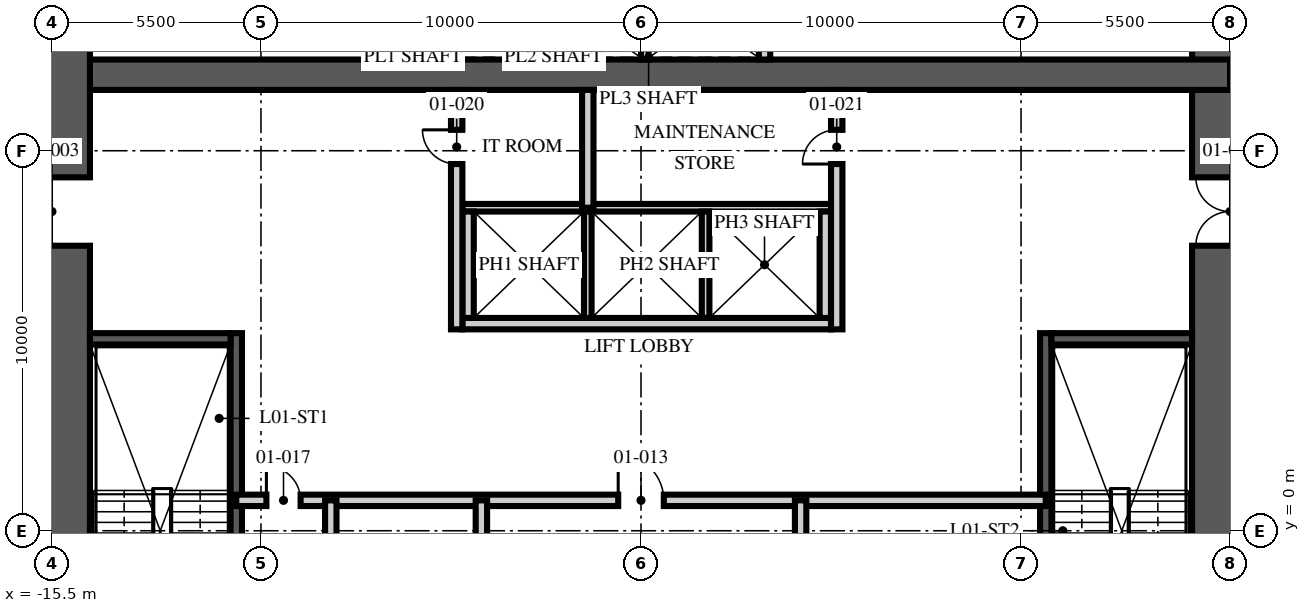
"""IFC4 building model, lengths in metres.
Left out: names, types, materials, properties, quantities, classifications, styles, units other than length and angle.
Written with IfcOpenShell. Run it as: python <this file> out.ifc"""

import sys

from ifc_helpers import new_model, si_unit, direction, frame, frame_2d, origin, place, context, subcontext, project, spatial, rectangle, extrude, element, fill, save


model = new_model("IFC4")
c1 = context("Model", 3, precision=1e-05, world=origin(), true_north=direction((0.0, 1.0)))
c2 = subcontext(c1, "Body", "Model", "MODEL_VIEW")
j1 = project(units=[si_unit("LENGTHUNIT", "METRE"), si_unit("PLANEANGLEUNIT", "RADIAN")], contexts=[c1])
p1 = place(None, origin())
s1 = spatial("IfcSite", under=j1, at=p1, CompositionType="ELEMENT")
p2 = place(p1, origin())
s2 = spatial("IfcBuilding", under=s1, at=p2, CompositionType="ELEMENT")
p3 = place(p2, frame((0.0, 0.0, 6.0)))
s3 = spatial("IfcBuildingStorey", under=s2, at=p3, CompositionType="ELEMENT", Elevation=6.0)
p4 = place(p3, frame((15.5, -15.5, -0.3), z_axis=(0.0, 0.0, 1.0), x_axis=(0.0, 1.0, 0.0)))
e1 = element("IfcWall", 1, at=p4, inside=s3, PredefinedType="SHEAR", context=c2, shape_type="SweptSolid", body=[
    extrude(rectangle(XDim=31.0, YDim=2.0, at=frame_2d((15.5, 0.0))), origin(), (0.0, 0.0, 1.0), 5.0),
])
p5 = place(p4, frame((6.5, 0.0, 0.3)))
e2 = element("IfcOpeningElement", 2, at=p5, cuts=e1, PredefinedType="OPENING", context=c2, shape_type="SweptSolid", body=[
    extrude(rectangle(XDim=1.2, YDim=2.1, at=frame_2d((0.6, 1.05))), frame((0.0, 1.01, 0.0), z_axis=(0.0, -1.0, 0.0), x_axis=(1.0, 0.0, 0.0)), (0.0, 0.0, 1.0), 2.02),
])
p6 = place(p4, frame((23.0, 0.0, 0.3)))
e3 = element("IfcOpeningElement", 3, at=p6, cuts=e1, PredefinedType="OPENING", context=c2, shape_type="SweptSolid", body=[
    extrude(rectangle(XDim=1.8, YDim=2.1, at=frame_2d((0.9, 1.05))), frame((0.0, 1.01, 0.0), z_axis=(0.0, -1.0, 0.0), x_axis=(1.0, 0.0, 0.0)), (0.0, 0.0, 1.0), 2.02),
])
p7 = place(p3, frame((-15.5, 12.0, -0.3), z_axis=(0.0, 0.0, 1.0), x_axis=(1.0, 0.0, 0.0)))
e4 = element("IfcWall", 4, at=p7, inside=s3, PredefinedType="SHEAR", context=c2, shape_type="SweptSolid", body=[
    extrude(rectangle(XDim=31.0, YDim=0.8, at=frame_2d((15.5, 0.0))), origin(), (0.0, 0.0, 1.0), 5.0),
])
p8 = place(p3, frame((-15.5, -15.5, -0.3), z_axis=(0.0, 0.0, 1.0), x_axis=(0.0, 1.0, 0.0)))
e5 = element("IfcWall", 5, at=p8, inside=s3, PredefinedType="SHEAR", context=c2, shape_type="SweptSolid", body=[
    extrude(rectangle(XDim=31.0, YDim=2.0, at=frame_2d((15.5, 0.0))), origin(), (0.0, 0.0, 1.0), 5.0),
])
p9 = place(p8, frame((6.5, 0.0, 0.3)))
e6 = element("IfcOpeningElement", 6, at=p9, cuts=e5, PredefinedType="OPENING", context=c2, shape_type="SweptSolid", body=[
    extrude(rectangle(XDim=1.2, YDim=2.1, at=frame_2d((0.6, 1.05))), frame((0.0, 1.01, 0.0), z_axis=(0.0, -1.0, 0.0), x_axis=(1.0, 0.0, 0.0)), (0.0, 0.0, 1.0), 2.02),
])
p10 = place(p8, frame((23.0, 0.0, 0.3)))
e7 = element("IfcOpeningElement", 7, at=p10, cuts=e5, PredefinedType="OPENING", context=c2, shape_type="SweptSolid", body=[
    extrude(rectangle(XDim=1.8, YDim=2.1, at=frame_2d((0.9, 1.05))), frame((0.0, 1.01, 0.0), z_axis=(0.0, -1.0, 0.0), x_axis=(1.0, 0.0, 0.0)), (0.0, 0.0, 1.0), 2.02),
])
p11 = place(p3, frame((-10.65, -4.9, 0.0), z_axis=(0.0, 0.0, 1.0), x_axis=(0.0, 1.0, 0.0)))
e8 = element("IfcWall", 8, at=p11, inside=s3, PredefinedType="SOLIDWALL", context=c2, shape_type="SweptSolid", body=[
    extrude(rectangle(XDim=10.1, YDim=0.3, at=frame_2d((5.05, 0.0))), origin(), (0.0, 0.0, 1.0), 4.7),
])
p12 = place(p3, frame((-14.5, 5.05, 0.0), z_axis=(0.0, 0.0, 1.0), x_axis=(1.0, 0.0, 0.0)))
e9 = element("IfcWall", 9, at=p12, inside=s3, PredefinedType="SOLIDWALL", context=c2, shape_type="SweptSolid", body=[
    extrude(rectangle(XDim=3.7, YDim=0.3, at=frame_2d((1.85, 0.0))), origin(), (0.0, 0.0, 1.0), 4.7),
])
p13 = place(p3, frame((10.65, -4.9, 0.0), z_axis=(0.0, 0.0, 1.0), x_axis=(0.0, 1.0, 0.0)))
e10 = element("IfcWall", 10, at=p13, inside=s3, PredefinedType="SOLIDWALL", context=c2, shape_type="SweptSolid", body=[
    extrude(rectangle(XDim=10.1, YDim=0.3, at=frame_2d((5.05, 0.0))), origin(), (0.0, 0.0, 1.0), 4.7),
])
p14 = place(p3, frame((14.5, 5.05, 0.0), z_axis=(0.0, 0.0, 1.0), x_axis=(-1.0, 0.0, 0.0)))
e11 = element("IfcWall", 11, at=p14, inside=s3, PredefinedType="SOLIDWALL", context=c2, shape_type="SweptSolid", body=[
    extrude(rectangle(XDim=3.7, YDim=0.3, at=frame_2d((1.85, 0.0))), origin(), (0.0, 0.0, 1.0), 4.7),
])
p15 = place(p3, frame((-4.7, 5.45, 0.0), z_axis=(0.0, 0.0, 1.0), x_axis=(1.0, 0.0, 0.0)))
e12 = element("IfcWall", 12, at=p15, inside=s3, PredefinedType="PARTITIONING", context=c2, shape_type="SweptSolid", body=[
    extrude(rectangle(XDim=9.7, YDim=0.3, at=frame_2d((4.85, 0.0))), origin(), (0.0, 0.0, 1.0), 4.7),
])
p16 = place(p3, frame((-4.7, 8.5, 0.0), z_axis=(0.0, 0.0, 1.0), x_axis=(1.0, 0.0, 0.0)))
e13 = element("IfcWall", 13, at=p16, inside=s3, PredefinedType="PARTITIONING", context=c2, shape_type="SweptSolid", body=[
    extrude(rectangle(XDim=9.7, YDim=0.2, at=frame_2d((4.85, 0.0))), origin(), (0.0, 0.0, 1.0), 4.7),
])
for number, where, z_axis, x_axis in (
    (14, (-4.55, 5.6, 0.0), (0.0, 0.0, 1.0), (0.0, 1.0, 0.0)),
    (15, (4.85, 5.6, 0.0), (0.0, 0.0, 1.0), (0.0, 1.0, 0.0)),
):
    element("IfcWall", number, at=place(p3, frame(where, z_axis=z_axis, x_axis=x_axis)), inside=s3, PredefinedType="PARTITIONING", context=c2, shape_type="SweptSolid", body=[
        extrude(rectangle(XDim=2.8, YDim=0.3, at=frame_2d((1.4, 0.0))), origin(), (0.0, 0.0, 1.0), 4.7),
    ])
for number, where, z_axis, x_axis in (
    (16, (-1.4, 5.6, 0.0), (0.0, 0.0, 1.0), (0.0, 1.0, 0.0)),
    (17, (1.7, 5.6, 0.0), (0.0, 0.0, 1.0), (0.0, 1.0, 0.0)),
):
    element("IfcWall", number, at=place(p3, frame(where, z_axis=z_axis, x_axis=x_axis)), inside=s3, PredefinedType="PARTITIONING", context=c2, shape_type="SweptSolid", body=[
        extrude(rectangle(XDim=2.8, YDim=0.2, at=frame_2d((1.4, 0.0))), origin(), (0.0, 0.0, 1.0), 4.7),
    ])
for number, where, z_axis, x_axis in (
    (18, (-6.15, 12.4, 0.0), (0.0, 0.0, 1.0), (0.0, 1.0, 0.0)),
    (19, (3.25, 12.4, 0.0), (0.0, 0.0, 1.0), (0.0, 1.0, 0.0)),
):
    element("IfcWall", number, at=place(p3, frame(where, z_axis=z_axis, x_axis=x_axis)), inside=s3, PredefinedType="PARTITIONING", context=c2, shape_type="SweptSolid", body=[
        extrude(rectangle(XDim=2.1, YDim=0.3, at=frame_2d((1.05, 0.0))), origin(), (0.0, 0.0, 1.0), 4.7),
    ])
for number, where, z_axis, x_axis in (
    (20, (-3.0, 12.4, 0.0), (0.0, 0.0, 1.0), (0.0, 1.0, 0.0)),
    (21, (0.1, 12.4, 0.0), (0.0, 0.0, 1.0), (0.0, 1.0, 0.0)),
):
    element("IfcWall", number, at=place(p3, frame(where, z_axis=z_axis, x_axis=x_axis)), inside=s3, PredefinedType="PARTITIONING", context=c2, shape_type="SweptSolid", body=[
        extrude(rectangle(XDim=2.1, YDim=0.2, at=frame_2d((1.05, 0.0))), origin(), (0.0, 0.0, 1.0), 4.7),
    ])
p17 = place(p3, frame((-10.65, 0.8, 0.0), z_axis=(0.0, 0.0, 1.0), x_axis=(1.0, 0.0, 0.0)))
e22 = element("IfcWall", 22, at=p17, inside=s3, PredefinedType="PARTITIONING", context=c2, shape_type="SweptSolid", body=[
    extrude(rectangle(XDim=21.3, YDim=0.3, at=frame_2d((10.65, 0.0))), origin(), (0.0, 0.0, 1.0), 4.7),
])
p18 = place(p17, frame((10.05, 0.0, 0.0)))
e23 = element("IfcOpeningElement", 23, at=p18, cuts=e22, PredefinedType="OPENING", context=c2, shape_type="SweptSolid", body=[
    extrude(rectangle(XDim=1.2, YDim=2.1, at=frame_2d((0.6, 1.05))), frame((0.0, 0.16, 0.0), z_axis=(0.0, -1.0, 0.0), x_axis=(1.0, 0.0, 0.0)), (0.0, 0.0, 1.0), 0.32),
])
p19 = place(p17, frame((0.793, 0.0, 0.0)))
e24 = element("IfcOpeningElement", 24, at=p19, cuts=e22, PredefinedType="OPENING", context=c2, shape_type="SweptSolid", body=[
    extrude(rectangle(XDim=0.9, YDim=2.1, at=frame_2d((0.45, 1.05))), frame((0.0, 0.16, 0.0), z_axis=(0.0, -1.0, 0.0), x_axis=(1.0, 0.0, 0.0)), (0.0, 0.0, 1.0), 0.32),
])
p20 = place(p3, frame((-4.2, -6.65, 0.0), z_axis=(0.0, 0.0, 1.0), x_axis=(0.0, 1.0, 0.0)))
e25 = element("IfcWall", 25, at=p20, inside=s3, PredefinedType="PARTITIONING", context=c2, shape_type="SweptSolid", body=[
    extrude(rectangle(XDim=7.45, YDim=0.3, at=frame_2d((3.725, 0.0))), origin(), (0.0, 0.0, 1.0), 4.7),
])
p21 = place(p20, frame((3.275, 0.0, 0.0)))
e26 = element("IfcOpeningElement", 26, at=p21, cuts=e25, PredefinedType="OPENING", context=c2, shape_type="SweptSolid", body=[
    extrude(rectangle(XDim=0.9, YDim=2.1, at=frame_2d((0.45, 1.05))), frame((0.0, 0.16, 0.0), z_axis=(0.0, -1.0, 0.0), x_axis=(1.0, 0.0, 0.0)), (0.0, 0.0, 1.0), 0.32),
])
p22 = place(p3, frame((4.2, -6.65, 0.0), z_axis=(0.0, 0.0, 1.0), x_axis=(0.0, 1.0, 0.0)))
e27 = element("IfcWall", 27, at=p22, inside=s3, PredefinedType="PARTITIONING", context=c2, shape_type="SweptSolid", body=[
    extrude(rectangle(XDim=7.45, YDim=0.3, at=frame_2d((3.725, 0.0))), origin(), (0.0, 0.0, 1.0), 4.7),
])
p23 = place(p22, frame((0.866, 0.0, 0.0)))
e28 = element("IfcOpeningElement", 28, at=p23, cuts=e27, PredefinedType="OPENING", context=c2, shape_type="SweptSolid", body=[
    extrude(rectangle(XDim=0.9, YDim=2.1, at=frame_2d((0.45, 1.05))), frame((0.0, 0.16, 0.0), z_axis=(0.0, -1.0, 0.0), x_axis=(1.0, 0.0, 0.0)), (0.0, 0.0, 1.0), 0.32),
])
p24 = place(p22, frame((4.591, 0.0, 0.0)))
e29 = element("IfcOpeningElement", 29, at=p24, cuts=e27, PredefinedType="OPENING", context=c2, shape_type="SweptSolid", body=[
    extrude(rectangle(XDim=0.9, YDim=2.1, at=frame_2d((0.45, 1.05))), frame((0.0, 0.16, 0.0), z_axis=(0.0, -1.0, 0.0), x_axis=(1.0, 0.0, 0.0)), (0.0, 0.0, 1.0), 0.32),
])
p25 = place(p3, frame((-8.163, -6.65, 0.0), z_axis=(0.0, 0.0, 1.0), x_axis=(0.0, 1.0, 0.0)))
e30 = element("IfcWall", 30, at=p25, inside=s3, PredefinedType="PARTITIONING", context=c2, shape_type="SweptSolid", body=[
    extrude(rectangle(XDim=7.45, YDim=0.3, at=frame_2d((3.725, 0.0))), origin(), (0.0, 0.0, 1.0), 4.7),
])
p26 = place(p3, frame((-4.85, 5.3, 0.0), z_axis=(0.0, 0.0, 1.0), x_axis=(0.0, 1.0, 0.0)))
e31 = element("IfcWall", 31, at=p26, inside=s3, PredefinedType="PARTITIONING", context=c2, shape_type="SweptSolid", body=[
    extrude(rectangle(XDim=6.3, YDim=0.3, at=frame_2d((3.15, 0.0))), origin(), (0.0, 0.0, 1.0), 4.7),
])
p27 = place(p26, frame((4.35, 0.0, 0.0)))
e32 = element("IfcOpeningElement", 32, at=p27, cuts=e31, PredefinedType="OPENING", context=c2, shape_type="SweptSolid", body=[
    extrude(rectangle(XDim=0.9, YDim=2.1, at=frame_2d((0.45, 1.05))), frame((0.0, 0.16, 0.0), z_axis=(0.0, -1.0, 0.0), x_axis=(1.0, 0.0, 0.0)), (0.0, 0.0, 1.0), 0.32),
])
p28 = place(p3, frame((5.15, 5.3, 0.0), z_axis=(0.0, 0.0, 1.0), x_axis=(0.0, 1.0, 0.0)))
e33 = element("IfcWall", 33, at=p28, inside=s3, PredefinedType="PARTITIONING", context=c2, shape_type="SweptSolid", body=[
    extrude(rectangle(XDim=6.3, YDim=0.3, at=frame_2d((3.15, 0.0))), origin(), (0.0, 0.0, 1.0), 4.7),
])
p29 = place(p28, frame((4.35, 0.0, 0.0)))
e34 = element("IfcOpeningElement", 34, at=p29, cuts=e33, PredefinedType="OPENING", context=c2, shape_type="SweptSolid", body=[
    extrude(rectangle(XDim=0.9, YDim=2.1, at=frame_2d((0.45, 1.05))), frame((0.0, 0.16, 0.0), z_axis=(0.0, -1.0, 0.0), x_axis=(1.0, 0.0, 0.0)), (0.0, 0.0, 1.0), 0.32),
])
p30 = place(p3, frame((-1.4, 8.5, 0.0), z_axis=(0.0, 0.0, 1.0), x_axis=(0.0, 1.0, 0.0)))
e35 = element("IfcWall", 35, at=p30, inside=s3, PredefinedType="PARTITIONING", context=c2, shape_type="SweptSolid", body=[
    extrude(rectangle(XDim=3.1, YDim=0.3, at=frame_2d((1.55, 0.0))), origin(), (0.0, 0.0, 1.0), 4.7),
])
p31 = place(p10, origin())
e36 = element("IfcDoor", 36, at=p31, inside=s3, OperationType="DOUBLE_DOOR_SINGLE_SWING", PredefinedType="DOOR", context=c2, shape_type="SweptSolid", body=[
    extrude(rectangle(XDim=1.8, YDim=2.1, at=frame_2d((0.9, 1.05))), frame((0.0, 0.025, 0.0), z_axis=(0.0, -1.0, 0.0), x_axis=(1.0, 0.0, 0.0)), (0.0, 0.0, 1.0), 0.05),
])
fill(e7, e36)
p32 = place(p6, origin())
e37 = element("IfcDoor", 37, at=p32, inside=s3, OperationType="DOUBLE_DOOR_SINGLE_SWING", PredefinedType="DOOR", context=c2, shape_type="SweptSolid", body=[
    extrude(rectangle(XDim=1.8, YDim=2.1, at=frame_2d((0.9, 1.05))), frame((0.0, 0.025, 0.0), z_axis=(0.0, -1.0, 0.0), x_axis=(1.0, 0.0, 0.0)), (0.0, 0.0, 1.0), 0.05),
])
fill(e3, e37)
p33 = place(p18, origin())
e38 = element("IfcDoor", 38, at=p33, inside=s3, OperationType="SINGLE_SWING_LEFT", PredefinedType="DOOR", context=c2, shape_type="SweptSolid", body=[
    extrude(rectangle(XDim=1.2, YDim=2.1, at=frame_2d((0.6, 1.05))), frame((0.0, 0.025, 0.0), z_axis=(0.0, -1.0, 0.0), x_axis=(1.0, 0.0, 0.0)), (0.0, 0.0, 1.0), 0.05),
])
fill(e23, e38)
p34 = place(p19, origin())
e39 = element("IfcDoor", 39, at=p34, inside=s3, OperationType="SINGLE_SWING_LEFT", PredefinedType="DOOR", context=c2, shape_type="SweptSolid", body=[
    extrude(rectangle(XDim=0.9, YDim=2.1, at=frame_2d((0.45, 1.05))), frame((0.0, 0.025, 0.0), z_axis=(0.0, -1.0, 0.0), x_axis=(1.0, 0.0, 0.0)), (0.0, 0.0, 1.0), 0.05),
])
fill(e24, e39)
p35 = place(p27, origin())
e40 = element("IfcDoor", 40, at=p35, inside=s3, OperationType="SINGLE_SWING_RIGHT", PredefinedType="DOOR", context=c2, shape_type="SweptSolid", body=[
    extrude(rectangle(XDim=0.9, YDim=2.1, at=frame_2d((0.45, 1.05))), frame((0.0, 0.025, 0.0), z_axis=(0.0, -1.0, 0.0), x_axis=(1.0, 0.0, 0.0)), (0.0, 0.0, 1.0), 0.05),
])
fill(e32, e40)
p36 = place(p29, origin())
e41 = element("IfcDoor", 41, at=p36, inside=s3, OperationType="SINGLE_SWING_LEFT", PredefinedType="DOOR", context=c2, shape_type="SweptSolid", body=[
    extrude(rectangle(XDim=0.9, YDim=2.1, at=frame_2d((0.45, 1.05))), frame((0.0, 0.025, 0.0), z_axis=(0.0, -1.0, 0.0), x_axis=(1.0, 0.0, 0.0)), (0.0, 0.0, 1.0), 0.05),
])
fill(e34, e41)
save(model, sys.argv[1])
